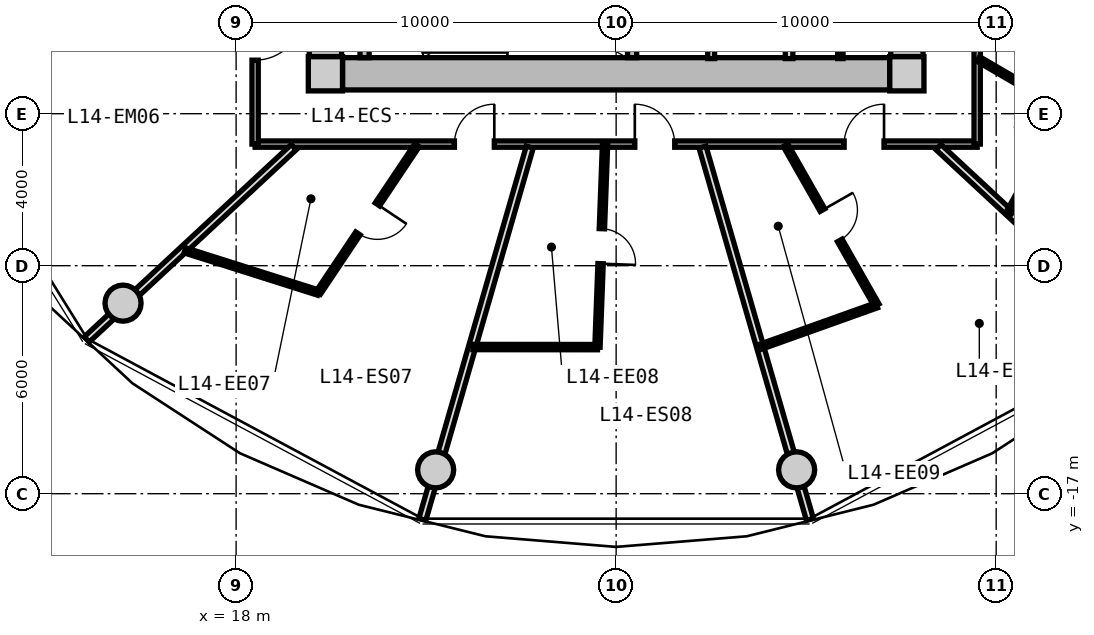
"""IFC4 building model, lengths in metres.
Left out: names, types, materials, properties, quantities, classifications, styles, units other than length and angle.
Written with IfcOpenShell. Run it as: python <this file> out.ifc"""

import sys

from ifc_helpers import new_model, si_unit, direction, frame, frame_2d, origin, origin_2d, place, context, subcontext, project, spatial, rectangle, circle, extrude, source, transform, mapped, element, fill, save


model = new_model("IFC4")
c1 = context("Model", 3, precision=1e-05, world=origin(), true_north=direction((0.0, 1.0)))
c2 = subcontext(c1, "Body", "Model", "MODEL_VIEW")
j1 = project(units=[si_unit("LENGTHUNIT", "METRE"), si_unit("PLANEANGLEUNIT", "RADIAN")], contexts=[c1])
p1 = place(None, origin())
s1 = spatial("IfcSite", under=j1, at=p1, CompositionType="ELEMENT")
p2 = place(p1, origin())
s2 = spatial("IfcBuilding", under=s1, at=p2, CompositionType="ELEMENT")
p3 = place(p2, frame((0.0, 0.0, 49.05)))
s3 = spatial("IfcBuildingStorey", under=s2, at=p3, CompositionType="ELEMENT", Elevation=49.05)
m1 = source(origin(), c2, "Body", "SweptSolid", [
    extrude(rectangle(XDim=0.9, YDim=0.9, at=origin_2d()), origin(), (0.0, 0.0, 1.0), 3.05),
])
for number, where, z_axis, x_axis in (
    (1, (20.35, -5.95, 0.0), (0.0, 0.0, 1.0), (1.0, 0.0, 0.0)),
    (2, (35.65, -5.95, 0.0), (0.0, 0.0, 1.0), (1.0, 0.0, 0.0)),
):
    element("IfcColumn", number, at=place(p3, frame(where, z_axis=z_axis, x_axis=x_axis)), inside=s3, PredefinedType="COLUMN", context=c2, shape_type="MappedRepresentation", body=[
        mapped(m1, transform((0.0, 0.0, 0.0), x_axis=(1.0, 0.0, 0.0), y_axis=(0.0, 1.0, 0.0), z_axis=(0.0, 0.0, 1.0), scale=1.0)),
    ])
m2 = source(origin(), c2, "Body", "SweptSolid", [
    extrude(rectangle(XDim=14.4, YDim=0.85, at=frame_2d((7.2, 0.0))), origin(), (0.0, 0.0, 1.0), 2.79),
])
p4 = place(p3, frame((35.2, -5.95, 0.0), z_axis=(0.0, 0.0, 1.0), x_axis=(-1.0, 0.0, 0.0)))
e3 = element("IfcWall", 3, at=p4, inside=s3, PredefinedType="SHEAR", context=c2, shape_type="MappedRepresentation", body=[
    mapped(m2, transform((0.0, 0.0, 0.0), x_axis=(1.0, 0.0, 0.0), y_axis=(0.0, 1.0, 0.0), z_axis=(0.0, 0.0, 1.0), scale=1.0)),
])
m3 = source(origin(), c2, "Body", "SweptSolid", [
    extrude(rectangle(XDim=11.0, YDim=0.85, at=frame_2d((5.5, 0.0))), origin(), (0.0, 0.0, 1.0), 2.79),
])
p5 = place(p3, frame((20.35, -5.5, 0.0), z_axis=(0.0, 0.0, 1.0), x_axis=(0.0, 1.0, 0.0)))
e4 = element("IfcWall", 4, at=p5, inside=s3, PredefinedType="SHEAR", context=c2, shape_type="MappedRepresentation", body=[
    mapped(m3, transform((0.0, 0.0, 0.0), x_axis=(1.0, 0.0, 0.0), y_axis=(0.0, 1.0, 0.0), z_axis=(0.0, 0.0, 1.0), scale=1.0)),
])
p6 = place(p5, frame((3.8, 0.0, 0.0)))
e5 = element("IfcOpeningElement", 5, at=p6, cuts=e4, PredefinedType="OPENING", context=c2, shape_type="SweptSolid", body=[
    extrude(rectangle(XDim=1.2, YDim=2.15, at=frame_2d((0.6, 1.075))), frame((0.0, 0.435, 0.0), z_axis=(0.0, -1.0, 0.0), x_axis=(1.0, 0.0, 0.0)), (0.0, 0.0, 1.0), 0.87),
])
p7 = place(p3, frame((35.65, 5.5, 0.0), z_axis=(0.0, 0.0, 1.0), x_axis=(0.0, -1.0, 0.0)))
e6 = element("IfcWall", 6, at=p7, inside=s3, PredefinedType="SHEAR", context=c2, shape_type="MappedRepresentation", body=[
    mapped(m3, transform((0.0, 0.0, 0.0), x_axis=(1.0, 0.0, 0.0), y_axis=(0.0, 1.0, 0.0), z_axis=(0.0, 0.0, 1.0), scale=1.0)),
])
p8 = place(p7, frame((5.65, 0.0, 0.0)))
e7 = element("IfcOpeningElement", 7, at=p8, cuts=e6, PredefinedType="OPENING", context=c2, shape_type="SweptSolid", body=[
    extrude(rectangle(XDim=1.2, YDim=2.15, at=frame_2d((0.6, 1.075))), frame((0.0, 0.435, 0.0), z_axis=(0.0, -1.0, 0.0), x_axis=(1.0, 0.0, 0.0)), (0.0, 0.0, 1.0), 0.87),
])
m4 = source(origin(), c2, "Body", "SweptSolid", [
    extrude(circle(Radius=0.475, at=origin_2d()), origin(), (0.0, 0.0, 1.0), 3.05),
])
for number, where, z_axis, x_axis in (
    (8, (15.025, -11.985, 0.0), (0.0, 0.0, 1.0), (1.0, 0.0, 0.0)),
    (9, (23.251, -16.373, 0.0), (0.0, 0.0, 1.0), (1.0, 0.0, 0.0)),
    (10, (32.749, -16.373, 0.0), (0.0, 0.0, 1.0), (1.0, 0.0, 0.0)),
):
    element("IfcColumn", number, at=place(p3, frame(where, z_axis=z_axis, x_axis=x_axis)), inside=s3, PredefinedType="COLUMN", context=c2, shape_type="MappedRepresentation", body=[
        mapped(m4, transform((0.0, 0.0, 0.0), x_axis=(1.0, 0.0, 0.0), y_axis=(0.0, 1.0, 0.0), z_axis=(0.0, 0.0, 1.0), scale=1.0)),
    ])
m5 = source(origin(), c2, "Body", "SweptSolid", [
    extrude(rectangle(XDim=3.075, YDim=0.24, at=frame_2d((1.538, 0.0))), origin(), (0.0, 0.0, 1.0), 2.79),
])
for number, where, z_axis, x_axis in (
    (11, (21.38, -5.525, 0.0), (0.0, 0.0, 1.0), (0.0, 1.0, 0.0)),
    (12, (28.42, -5.525, 0.0), (0.0, 0.0, 1.0), (0.0, 1.0, 0.0)),
):
    element("IfcWall", number, at=place(p3, frame(where, z_axis=z_axis, x_axis=x_axis)), inside=s3, PredefinedType="PARTITIONING", context=c2, shape_type="MappedRepresentation", body=[
        mapped(m5, transform((0.0, 0.0, 0.0), x_axis=(1.0, 0.0, 0.0), y_axis=(0.0, 1.0, 0.0), z_axis=(0.0, 0.0, 1.0), scale=1.0)),
    ])
m6 = source(origin(), c2, "Body", "SweptSolid", [
    extrude(rectangle(XDim=3.8, YDim=0.2, at=frame_2d((1.9, 0.0))), origin(), (0.0, 0.0, 1.0), 2.775),
])
p9 = place(p3, frame((32.55, -5.55, 0.0), z_axis=(0.0, 0.0, 1.0), x_axis=(0.0, 1.0, 0.0)))
e13 = element("IfcWall", 13, at=p9, inside=s3, PredefinedType="PARTITIONING", context=c2, shape_type="MappedRepresentation", body=[
    mapped(m6, transform((0.0, 0.0, 0.0), x_axis=(1.0, 0.0, 0.0), y_axis=(0.0, 1.0, 0.0), z_axis=(0.0, 0.0, 1.0), scale=1.0)),
])
m7 = source(origin(), c2, "Body", "SweptSolid", [
    extrude(rectangle(XDim=3.22, YDim=0.18, at=frame_2d((1.61, 0.0))), origin(), (0.0, 0.0, 1.0), 2.775),
])
p10 = place(p3, frame((30.5, -5.55, 0.0), z_axis=(0.0, 0.0, 1.0), x_axis=(0.0, 1.0, 0.0)))
e14 = element("IfcWall", 14, at=p10, inside=s3, PredefinedType="PARTITIONING", context=c2, shape_type="MappedRepresentation", body=[
    mapped(m7, transform((0.0, 0.0, 0.0), x_axis=(1.0, 0.0, 0.0), y_axis=(0.0, 1.0, 0.0), z_axis=(0.0, 0.0, 1.0), scale=1.0)),
])
m8 = source(origin(), c2, "Body", "SweptSolid", [
    extrude(rectangle(XDim=3.8, YDim=0.14, at=frame_2d((1.9, 0.0))), origin(), (0.0, 0.0, 1.0), 2.775),
])
p11 = place(p3, frame((33.9, -5.55, 0.0), z_axis=(0.0, 0.0, 1.0), x_axis=(0.0, 1.0, 0.0)))
e15 = element("IfcWall", 15, at=p11, inside=s3, PredefinedType="PARTITIONING", context=c2, shape_type="MappedRepresentation", body=[
    mapped(m8, transform((0.0, 0.0, 0.0), x_axis=(1.0, 0.0, 0.0), y_axis=(0.0, 1.0, 0.0), z_axis=(0.0, 0.0, 1.0), scale=1.0)),
])
m9 = source(origin(), c2, "Body", "SweptSolid", [
    extrude(rectangle(XDim=19.0, YDim=0.165, at=frame_2d((9.5, 0.0))), origin(), (0.0, 0.0, 1.0), 2.775),
])
p12 = place(p3, frame((37.5, -7.8, 0.0), z_axis=(0.0, 0.0, 1.0), x_axis=(-1.0, 0.0, 0.0)))
e16 = element("IfcWall", 16, at=p12, inside=s3, PredefinedType="PARTITIONING", context=c2, shape_type="MappedRepresentation", body=[
    mapped(m9, transform((0.0, 0.0, 0.0), x_axis=(1.0, 0.0, 0.0), y_axis=(0.0, 1.0, 0.0), z_axis=(0.0, 0.0, 1.0), scale=1.0)),
])
p13 = place(p12, frame((12.706, 0.0, 0.0)))
e17 = element("IfcOpeningElement", 17, at=p13, cuts=e16, PredefinedType="OPENING", context=c2, shape_type="SweptSolid", body=[
    extrude(rectangle(XDim=1.05, YDim=2.15, at=frame_2d((0.525, 1.075))), frame((0.0, 0.093, 0.0), z_axis=(0.0, -1.0, 0.0), x_axis=(1.0, 0.0, 0.0)), (0.0, 0.0, 1.0), 0.185),
])
p14 = place(p12, frame((7.959, 0.0, 0.0)))
e18 = element("IfcOpeningElement", 18, at=p14, cuts=e16, PredefinedType="OPENING", context=c2, shape_type="SweptSolid", body=[
    extrude(rectangle(XDim=1.05, YDim=2.15, at=frame_2d((0.525, 1.075))), frame((0.0, 0.093, 0.0), z_axis=(0.0, -1.0, 0.0), x_axis=(1.0, 0.0, 0.0)), (0.0, 0.0, 1.0), 0.185),
])
p15 = place(p12, frame((2.451, 0.0, 0.0)))
e19 = element("IfcOpeningElement", 19, at=p15, cuts=e16, PredefinedType="OPENING", context=c2, shape_type="SweptSolid", body=[
    extrude(rectangle(XDim=1.05, YDim=2.15, at=frame_2d((0.525, 1.075))), frame((0.0, 0.093, 0.0), z_axis=(0.0, -1.0, 0.0), x_axis=(1.0, 0.0, 0.0)), (0.0, 0.0, 1.0), 0.185),
])
m10 = source(origin(), c2, "Body", "SweptSolid", [
    extrude(rectangle(XDim=15.6, YDim=0.165, at=frame_2d((7.8, 0.0))), origin(), (0.0, 0.0, 1.0), 2.775),
])
p16 = place(p3, frame((18.5, -7.8, 0.0), z_axis=(0.0, 0.0, 1.0), x_axis=(0.0, 1.0, 0.0)))
e20 = element("IfcWall", 20, at=p16, inside=s3, PredefinedType="PARTITIONING", context=c2, shape_type="MappedRepresentation", body=[
    mapped(m10, transform((0.0, 0.0, 0.0), x_axis=(1.0, 0.0, 0.0), y_axis=(0.0, 1.0, 0.0), z_axis=(0.0, 0.0, 1.0), scale=1.0)),
])
p17 = place(p16, frame((12.141, 0.0, 0.0)))
e21 = element("IfcOpeningElement", 21, at=p17, cuts=e20, PredefinedType="OPENING", context=c2, shape_type="SweptSolid", body=[
    extrude(rectangle(XDim=1.25, YDim=2.2, at=frame_2d((0.625, 1.1))), frame((0.0, 0.093, 0.0), z_axis=(0.0, -1.0, 0.0), x_axis=(1.0, 0.0, 0.0)), (0.0, 0.0, 1.0), 0.185),
])
p18 = place(p16, frame((7.175, 0.0, 0.0)))
e22 = element("IfcOpeningElement", 22, at=p18, cuts=e20, PredefinedType="OPENING", context=c2, shape_type="SweptSolid", body=[
    extrude(rectangle(XDim=1.25, YDim=2.2, at=frame_2d((0.625, 1.1))), frame((0.0, 0.093, 0.0), z_axis=(0.0, -1.0, 0.0), x_axis=(1.0, 0.0, 0.0)), (0.0, 0.0, 1.0), 0.185),
])
p19 = place(p16, frame((2.208, 0.0, 0.0)))
e23 = element("IfcOpeningElement", 23, at=p19, cuts=e20, PredefinedType="OPENING", context=c2, shape_type="SweptSolid", body=[
    extrude(rectangle(XDim=1.25, YDim=2.2, at=frame_2d((0.625, 1.1))), frame((0.0, 0.093, 0.0), z_axis=(0.0, -1.0, 0.0), x_axis=(1.0, 0.0, 0.0)), (0.0, 0.0, 1.0), 0.185),
])
p20 = place(p3, frame((37.5, 7.8, 0.0), z_axis=(0.0, 0.0, 1.0), x_axis=(0.0, -1.0, 0.0)))
e24 = element("IfcWall", 24, at=p20, inside=s3, PredefinedType="PARTITIONING", context=c2, shape_type="MappedRepresentation", body=[
    mapped(m10, transform((0.0, 0.0, 0.0), x_axis=(1.0, 0.0, 0.0), y_axis=(0.0, 1.0, 0.0), z_axis=(0.0, 0.0, 1.0), scale=1.0)),
])
p21 = place(p20, frame((8.835, 0.0, 0.0)))
e25 = element("IfcOpeningElement", 25, at=p21, cuts=e24, PredefinedType="OPENING", context=c2, shape_type="SweptSolid", body=[
    extrude(rectangle(XDim=1.05, YDim=2.15, at=frame_2d((0.525, 1.075))), frame((0.0, 0.093, 0.0), z_axis=(0.0, -1.0, 0.0), x_axis=(1.0, 0.0, 0.0)), (0.0, 0.0, 1.0), 0.185),
])
p22 = place(p20, frame((2.208, 0.0, 0.0)))
e26 = element("IfcOpeningElement", 26, at=p22, cuts=e24, PredefinedType="OPENING", context=c2, shape_type="SweptSolid", body=[
    extrude(rectangle(XDim=1.25, YDim=2.2, at=frame_2d((0.625, 1.1))), frame((0.0, 0.093, 0.0), z_axis=(0.0, -1.0, 0.0), x_axis=(1.0, 0.0, 0.0)), (0.0, 0.0, 1.0), 0.185),
])
m11 = source(origin(), c2, "Body", "SweptSolid", [
    extrude(rectangle(XDim=7.435, YDim=0.19, at=frame_2d((3.717, 0.0))), origin(), (0.0, 0.0, 1.0), 2.225),
])
p23 = place(p3, frame((19.517, -7.88, 0.0), z_axis=(0.0, 0.0, 1.0), x_axis=(-0.732651956848, -0.680603489652, 0.0)))
e27 = element("IfcWall", 27, at=p23, inside=s3, PredefinedType="PARTITIONING", context=c2, shape_type="MappedRepresentation", body=[
    mapped(m11, transform((0.0, 0.0, 0.0), x_axis=(1.0, 0.0, 0.0), y_axis=(0.0, 1.0, 0.0), z_axis=(0.0, 0.0, 1.0), scale=1.0)),
])
m12 = source(origin(), c2, "Body", "SweptSolid", [
    extrude(rectangle(XDim=10.196, YDim=0.19, at=frame_2d((5.098, 0.0))), origin(), (0.0, 0.0, 1.0), 2.225),
])
p24 = place(p3, frame((25.727, -7.88, 0.0), z_axis=(0.0, 0.0, 1.0), x_axis=(-0.277136420347, -0.960830580549, 0.0)))
e28 = element("IfcWall", 28, at=p24, inside=s3, PredefinedType="PARTITIONING", context=c2, shape_type="MappedRepresentation", body=[
    mapped(m12, transform((0.0, 0.0, 0.0), x_axis=(1.0, 0.0, 0.0), y_axis=(0.0, 1.0, 0.0), z_axis=(0.0, 0.0, 1.0), scale=1.0)),
])
m13 = source(origin(), c2, "Body", "SweptSolid", [
    extrude(rectangle(XDim=4.668, YDim=0.14, at=frame_2d((2.334, 0.0))), origin(), (0.0, 0.0, 1.0), 2.775),
])
p25 = place(p3, frame((22.76, -7.83, 0.0), z_axis=(0.0, 0.0, 1.0), x_axis=(-0.55615986029, -0.83107533341, 0.0)))
e29 = element("IfcWall", 29, at=p25, inside=s3, PredefinedType="PARTITIONING", context=c2, shape_type="MappedRepresentation", body=[
    mapped(m13, transform((0.0, 0.0, 0.0), x_axis=(1.0, 0.0, 0.0), y_axis=(0.0, 1.0, 0.0), z_axis=(0.0, 0.0, 1.0), scale=1.0)),
])
p26 = place(p25, frame((1.874, 0.0, 0.0)))
e30 = element("IfcOpeningElement", 30, at=p26, cuts=e29, PredefinedType="OPENING", context=c2, shape_type="SweptSolid", body=[
    extrude(rectangle(XDim=0.92, YDim=2.1, at=frame_2d((0.46, 1.05))), frame((0.0, 0.08, 0.0), z_axis=(0.0, -1.0, 0.0), x_axis=(1.0, 0.0, 0.0)), (0.0, 0.0, 1.0), 0.16),
])
m14 = source(origin(), c2, "Body", "SweptSolid", [
    extrude(rectangle(XDim=3.684, YDim=0.14, at=frame_2d((1.842, 0.0))), origin(), (0.0, 0.0, 1.0), 2.775),
])
p27 = place(p3, frame((20.164, -11.709, 0.0), z_axis=(0.0, 0.0, 1.0), x_axis=(-0.953245538614, 0.302196861518, 0.0)))
e31 = element("IfcWall", 31, at=p27, inside=s3, PredefinedType="PARTITIONING", context=c2, shape_type="MappedRepresentation", body=[
    mapped(m14, transform((0.0, 0.0, 0.0), x_axis=(1.0, 0.0, 0.0), y_axis=(0.0, 1.0, 0.0), z_axis=(0.0, 0.0, 1.0), scale=1.0)),
])
p28 = place(p3, frame((30.273, -7.88, 0.0), z_axis=(0.0, 0.0, 1.0), x_axis=(0.277136420347, -0.960830580549, 0.0)))
e32 = element("IfcWall", 32, at=p28, inside=s3, PredefinedType="PARTITIONING", context=c2, shape_type="MappedRepresentation", body=[
    mapped(m12, transform((0.0, 0.0, 0.0), x_axis=(1.0, 0.0, 0.0), y_axis=(0.0, 1.0, 0.0), z_axis=(0.0, 0.0, 1.0), scale=1.0)),
])
m15 = source(origin(), c2, "Body", "SweptSolid", [
    extrude(rectangle(XDim=5.316, YDim=0.14, at=frame_2d((2.658, 0.0))), origin(), (0.0, 0.0, 1.0), 2.775),
])
p29 = place(p3, frame((27.707, -7.83, 0.0), z_axis=(0.0, 0.0, 1.0), x_axis=(-0.037380226447, -0.999301115115, 0.0)))
e33 = element("IfcWall", 33, at=p29, inside=s3, PredefinedType="PARTITIONING", context=c2, shape_type="MappedRepresentation", body=[
    mapped(m15, transform((0.0, 0.0, 0.0), x_axis=(1.0, 0.0, 0.0), y_axis=(0.0, 1.0, 0.0), z_axis=(0.0, 0.0, 1.0), scale=1.0)),
])
p30 = place(p29, frame((2.198, 0.0, 0.0)))
e34 = element("IfcOpeningElement", 34, at=p30, cuts=e33, PredefinedType="OPENING", context=c2, shape_type="SweptSolid", body=[
    extrude(rectangle(XDim=0.92, YDim=2.1, at=frame_2d((0.46, 1.05))), frame((0.0, 0.08, 0.0), z_axis=(0.0, -1.0, 0.0), x_axis=(1.0, 0.0, 0.0)), (0.0, 0.0, 1.0), 0.16),
])
m16 = source(origin(), c2, "Body", "SweptSolid", [
    extrude(rectangle(XDim=3.279, YDim=0.14, at=frame_2d((1.64, 0.0))), origin(), (0.0, 0.0, 1.0), 2.775),
])
p31 = place(p3, frame((27.509, -13.143, 0.0), z_axis=(0.0, 0.0, 1.0), x_axis=(-0.999999664619, 0.000819000544, 0.0)))
e35 = element("IfcWall", 35, at=p31, inside=s3, PredefinedType="PARTITIONING", context=c2, shape_type="MappedRepresentation", body=[
    mapped(m16, transform((0.0, 0.0, 0.0), x_axis=(1.0, 0.0, 0.0), y_axis=(0.0, 1.0, 0.0), z_axis=(0.0, 0.0, 1.0), scale=1.0)),
])
p32 = place(p3, frame((36.483, -7.88, 0.0), z_axis=(0.0, 0.0, 1.0), x_axis=(0.732651956848, -0.680603489652, 0.0)))
e36 = element("IfcWall", 36, at=p32, inside=s3, PredefinedType="PARTITIONING", context=c2, shape_type="MappedRepresentation", body=[
    mapped(m11, transform((0.0, 0.0, 0.0), x_axis=(1.0, 0.0, 0.0), y_axis=(0.0, 1.0, 0.0), z_axis=(0.0, 0.0, 1.0), scale=1.0)),
])
m17 = source(origin(), c2, "Body", "SweptSolid", [
    extrude(rectangle(XDim=4.846, YDim=0.14, at=frame_2d((2.423, 0.0))), origin(), (0.0, 0.0, 1.0), 2.775),
])
p33 = place(p3, frame((32.458, -7.83, 0.0), z_axis=(0.0, 0.0, 1.0), x_axis=(0.494841788743, -0.868983086207, 0.0)))
e37 = element("IfcWall", 37, at=p33, inside=s3, PredefinedType="PARTITIONING", context=c2, shape_type="MappedRepresentation", body=[
    mapped(m17, transform((0.0, 0.0, 0.0), x_axis=(1.0, 0.0, 0.0), y_axis=(0.0, 1.0, 0.0), z_axis=(0.0, 0.0, 1.0), scale=1.0)),
])
p34 = place(p33, frame((1.963, 0.0, 0.0)))
e38 = element("IfcOpeningElement", 38, at=p34, cuts=e37, PredefinedType="OPENING", context=c2, shape_type="SweptSolid", body=[
    extrude(rectangle(XDim=0.92, YDim=2.1, at=frame_2d((0.46, 1.05))), frame((0.0, 0.08, 0.0), z_axis=(0.0, -1.0, 0.0), x_axis=(1.0, 0.0, 0.0)), (0.0, 0.0, 1.0), 0.16),
])
m18 = source(origin(), c2, "Body", "SweptSolid", [
    extrude(rectangle(XDim=3.276, YDim=0.14, at=frame_2d((1.638, 0.0))), origin(), (0.0, 0.0, 1.0), 2.415),
])
p35 = place(p3, frame((34.857, -12.042, 0.0), z_axis=(0.0, 0.0, 1.0), x_axis=(-0.94174696961, -0.336322234221, 0.0)))
e39 = element("IfcWall", 39, at=p35, inside=s3, PredefinedType="PARTITIONING", context=c2, shape_type="MappedRepresentation", body=[
    mapped(m18, transform((0.0, 0.0, 0.0), x_axis=(1.0, 0.0, 0.0), y_axis=(0.0, 1.0, 0.0), z_axis=(0.0, 0.0, 1.0), scale=1.0)),
])
m19 = source(origin(), c2, "Body", "SweptSolid", [
    extrude(rectangle(XDim=2.669, YDim=0.14, at=frame_2d((1.335, 0.0))), origin(), (0.0, 0.0, 1.0), 2.775),
])
p36 = place(p3, frame((37.53, -5.561, 0.0), z_axis=(0.0, 0.0, 1.0), x_axis=(0.86369928178, -0.50400749067, 0.0)))
e40 = element("IfcWall", 40, at=p36, inside=s3, PredefinedType="PARTITIONING", context=c2, shape_type="MappedRepresentation", body=[
    mapped(m19, transform((0.0, 0.0, 0.0), x_axis=(1.0, 0.0, 0.0), y_axis=(0.0, 1.0, 0.0), z_axis=(0.0, 0.0, 1.0), scale=1.0)),
])
m20 = source(origin(), c2, "Body", "SweptSolid", [
    extrude(rectangle(XDim=3.121, YDim=0.14, at=frame_2d((1.561, 0.0))), origin(), (0.0, 0.0, 1.0), 2.775),
])
p37 = place(p3, frame((39.836, -6.906, 0.0), z_axis=(0.0, 0.0, 1.0), x_axis=(-0.487302357327, -0.873233309342, 0.0)))
e41 = element("IfcWall", 41, at=p37, inside=s3, PredefinedType="PARTITIONING", context=c2, shape_type="MappedRepresentation", body=[
    mapped(m20, transform((0.0, 0.0, 0.0), x_axis=(1.0, 0.0, 0.0), y_axis=(0.0, 1.0, 0.0), z_axis=(0.0, 0.0, 1.0), scale=1.0)),
])
p38 = place(p37, frame((1.101, 0.0, 0.0)))
e42 = element("IfcOpeningElement", 42, at=p38, cuts=e41, PredefinedType="OPENING", context=c2, shape_type="SweptSolid", body=[
    extrude(rectangle(XDim=0.92, YDim=2.1, at=frame_2d((0.46, 1.05))), frame((0.0, 0.08, 0.0), z_axis=(0.0, -1.0, 0.0), x_axis=(1.0, 0.0, 0.0)), (0.0, 0.0, 1.0), 0.16),
])
m21 = source(origin(), c2, "Body", "SweptSolid", [
    extrude(rectangle(XDim=1.25, YDim=2.2, at=frame_2d((0.625, 1.1))), frame((0.0, 0.025, 0.0), z_axis=(0.0, -1.0, 0.0), x_axis=(1.0, 0.0, 0.0)), (0.0, 0.0, 1.0), 0.05),
])
p39 = place(p19, frame((1.25, 0.0, 0.0), z_axis=(0.0, 0.0, 1.0), x_axis=(-1.0, 0.0, 0.0)))
e43 = element("IfcDoor", 43, at=p39, inside=s3, OperationType="SINGLE_SWING_LEFT", PredefinedType="DOOR", context=c2, shape_type="MappedRepresentation", body=[
    mapped(m21, transform((0.0, 0.0, 0.0), x_axis=(1.0, 0.0, 0.0), y_axis=(0.0, 1.0, 0.0), z_axis=(0.0, 0.0, 1.0), scale=1.0)),
])
fill(e23, e43)
m22 = source(origin(), c2, "Body", "SweptSolid", [
    extrude(rectangle(XDim=1.05, YDim=2.15, at=frame_2d((0.525, 1.075))), frame((0.0, 0.025, 0.0), z_axis=(0.0, -1.0, 0.0), x_axis=(1.0, 0.0, 0.0)), (0.0, 0.0, 1.0), 0.05),
])
p40 = place(p13, frame((1.05, 0.0, 0.0), z_axis=(0.0, 0.0, 1.0), x_axis=(-1.0, 0.0, 0.0)))
e44 = element("IfcDoor", 44, at=p40, inside=s3, OperationType="SINGLE_SWING_RIGHT", PredefinedType="DOOR", context=c2, shape_type="MappedRepresentation", body=[
    mapped(m22, transform((0.0, 0.0, 0.0), x_axis=(1.0, 0.0, 0.0), y_axis=(0.0, 1.0, 0.0), z_axis=(0.0, 0.0, 1.0), scale=1.0)),
])
fill(e17, e44)
m23 = source(origin(), c2, "Body", "SweptSolid", [
    extrude(rectangle(XDim=0.92, YDim=2.1, at=frame_2d((0.46, 1.05))), frame((0.0, 0.025, 0.0), z_axis=(0.0, -1.0, 0.0), x_axis=(1.0, 0.0, 0.0)), (0.0, 0.0, 1.0), 0.05),
])
p41 = place(p26, origin())
e45 = element("IfcDoor", 45, at=p41, inside=s3, OperationType="SINGLE_SWING_LEFT", PredefinedType="DOOR", context=c2, shape_type="MappedRepresentation", body=[
    mapped(m23, transform((0.0, 0.0, 0.0), x_axis=(1.0, 0.0, 0.0), y_axis=(0.0, 1.0, 0.0), z_axis=(0.0, 0.0, 1.0), scale=1.0)),
])
fill(e30, e45)
p42 = place(p14, frame((1.05, 0.0, 0.0), z_axis=(0.0, 0.0, 1.0), x_axis=(-1.0, 0.0, 0.0)))
e46 = element("IfcDoor", 46, at=p42, inside=s3, OperationType="SINGLE_SWING_LEFT", PredefinedType="DOOR", context=c2, shape_type="MappedRepresentation", body=[
    mapped(m22, transform((0.0, 0.0, 0.0), x_axis=(1.0, 0.0, 0.0), y_axis=(0.0, 1.0, 0.0), z_axis=(0.0, 0.0, 1.0), scale=1.0)),
])
fill(e18, e46)
p43 = place(p30, origin())
e47 = element("IfcDoor", 47, at=p43, inside=s3, OperationType="SINGLE_SWING_RIGHT", PredefinedType="DOOR", context=c2, shape_type="MappedRepresentation", body=[
    mapped(m23, transform((0.0, 0.0, 0.0), x_axis=(1.0, 0.0, 0.0), y_axis=(0.0, 1.0, 0.0), z_axis=(0.0, 0.0, 1.0), scale=1.0)),
])
fill(e34, e47)
p44 = place(p15, frame((1.05, 0.0, 0.0), z_axis=(0.0, 0.0, 1.0), x_axis=(-1.0, 0.0, 0.0)))
e48 = element("IfcDoor", 48, at=p44, inside=s3, OperationType="SINGLE_SWING_RIGHT", PredefinedType="DOOR", context=c2, shape_type="MappedRepresentation", body=[
    mapped(m22, transform((0.0, 0.0, 0.0), x_axis=(1.0, 0.0, 0.0), y_axis=(0.0, 1.0, 0.0), z_axis=(0.0, 0.0, 1.0), scale=1.0)),
])
fill(e19, e48)
p45 = place(p34, origin())
e49 = element("IfcDoor", 49, at=p45, inside=s3, OperationType="SINGLE_SWING_LEFT", PredefinedType="DOOR", context=c2, shape_type="MappedRepresentation", body=[
    mapped(m23, transform((0.0, 0.0, 0.0), x_axis=(1.0, 0.0, 0.0), y_axis=(0.0, 1.0, 0.0), z_axis=(0.0, 0.0, 1.0), scale=1.0)),
])
fill(e38, e49)
save(model, sys.argv[1])
